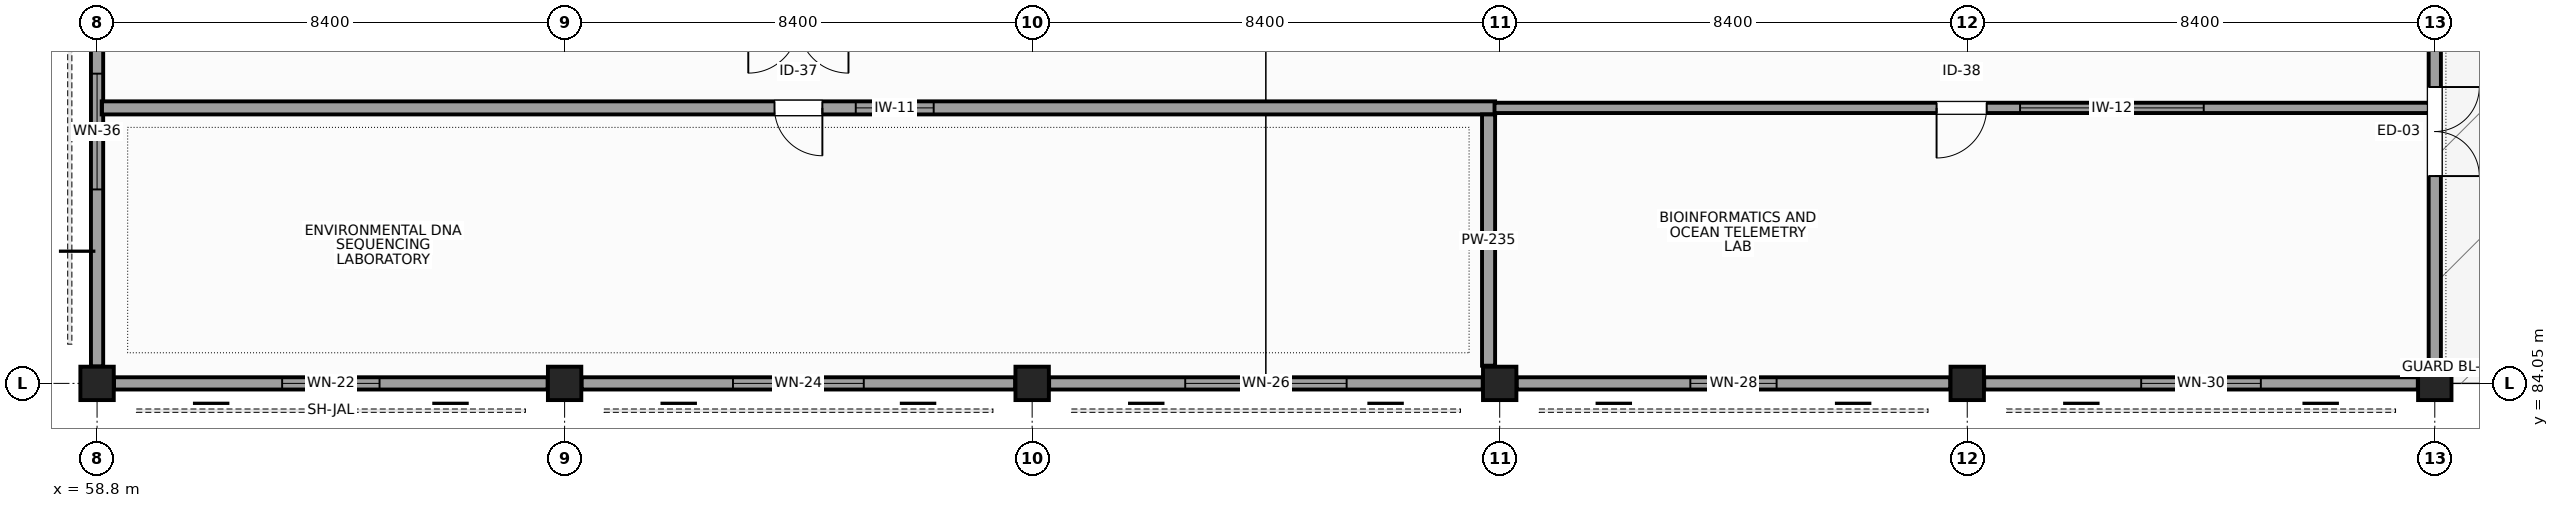
"""IFC4 building model, lengths in metres.
Left out: names, types, materials, properties, quantities, classifications, styles, units other than length and angle.
Written with IfcOpenShell. Run it as: python <this file> out.ifc"""

import sys

from ifc_helpers import new_model, si_unit, direction, frame, frame_2d, origin, origin_2d, place, context, subcontext, project, spatial, rectangle, extrude, element, fill, save


model = new_model("IFC4")
c1 = context("Model", 3, precision=1e-05, world=origin(), true_north=direction((0.0, 1.0)))
c2 = subcontext(c1, "Body", "Model", "MODEL_VIEW")
j1 = project(units=[si_unit("LENGTHUNIT", "METRE"), si_unit("PLANEANGLEUNIT", "RADIAN")], contexts=[c1])
p1 = place(None, origin())
s1 = spatial("IfcSite", under=j1, at=p1, CompositionType="ELEMENT")
p2 = place(p1, origin())
s2 = spatial("IfcBuilding", under=s1, at=p2, CompositionType="ELEMENT")
p3 = place(p2, frame((0.0, 0.0, 20.1)))
s3 = spatial("IfcBuildingStorey", under=s2, at=p3, CompositionType="ELEMENT", Elevation=20.1)
for number, where, z_axis, x_axis in (
    (1, (58.8, 84.05, 0.0), (0.0, 0.0, 1.0), (1.0, 0.0, 0.0)),
    (2, (67.2, 84.05, 0.0), (0.0, 0.0, 1.0), (1.0, 0.0, 0.0)),
    (3, (75.6, 84.05, 0.0), (0.0, 0.0, 1.0), (1.0, 0.0, 0.0)),
    (4, (84.0, 84.05, 0.0), (0.0, 0.0, 1.0), (1.0, 0.0, 0.0)),
    (5, (92.4, 84.05, 0.0), (0.0, 0.0, 1.0), (1.0, 0.0, 0.0)),
    (6, (100.8, 84.05, 0.0), (0.0, 0.0, 1.0), (1.0, 0.0, 0.0)),
):
    element("IfcColumn", number, at=place(p3, frame(where, z_axis=z_axis, x_axis=x_axis)), inside=s3, PredefinedType="COLUMN", context=c2, shape_type="SweptSolid", body=[
        extrude(rectangle(XDim=0.6, YDim=0.6, at=origin_2d()), origin(), (0.0, 0.0, 1.0), 4.5),
    ])
p4 = place(p3, frame((59.105, 84.05, 0.0), z_axis=(0.0, 0.0, 1.0), x_axis=(1.0, 0.0, 0.0)))
e7 = element("IfcWall", 7, at=p4, inside=s3, PredefinedType="STANDARD", context=c2, shape_type="SweptSolid", body=[
    extrude(rectangle(XDim=7.79, YDim=0.22, at=frame_2d((3.895, 0.0))), origin(), (0.0, 0.0, 1.0), 3.631),
])
p5 = place(p4, frame((3.02, 0.0, 0.95)))
e8 = element("IfcOpeningElement", 8, at=p5, cuts=e7, PredefinedType="OPENING", context=c2, shape_type="SweptSolid", body=[
    extrude(rectangle(XDim=1.75, YDim=1.95, at=frame_2d((0.875, 0.975))), frame((0.0, 0.12, 0.0), z_axis=(0.0, -1.0, 0.0), x_axis=(1.0, 0.0, 0.0)), (0.0, 0.0, 1.0), 0.24),
])
p6 = place(p3, frame((67.505, 84.05, 0.0), z_axis=(0.0, 0.0, 1.0), x_axis=(1.0, 0.0, 0.0)))
e9 = element("IfcWall", 9, at=p6, inside=s3, PredefinedType="STANDARD", context=c2, shape_type="SweptSolid", body=[
    extrude(rectangle(XDim=7.79, YDim=0.22, at=frame_2d((3.895, 0.0))), origin(), (0.0, 0.0, 1.0), 3.631),
])
p7 = place(p6, frame((2.72, 0.0, 0.95)))
e10 = element("IfcOpeningElement", 10, at=p7, cuts=e9, PredefinedType="OPENING", context=c2, shape_type="SweptSolid", body=[
    extrude(rectangle(XDim=2.35, YDim=1.7, at=frame_2d((1.175, 0.85))), frame((0.0, 0.12, 0.0), z_axis=(0.0, -1.0, 0.0), x_axis=(1.0, 0.0, 0.0)), (0.0, 0.0, 1.0), 0.24),
])
p8 = place(p3, frame((75.905, 84.05, 0.0), z_axis=(0.0, 0.0, 1.0), x_axis=(1.0, 0.0, 0.0)))
e11 = element("IfcWall", 11, at=p8, inside=s3, PredefinedType="STANDARD", context=c2, shape_type="SweptSolid", body=[
    extrude(rectangle(XDim=7.79, YDim=0.22, at=frame_2d((3.895, 0.0))), origin(), (0.0, 0.0, 1.0), 3.631),
])
p9 = place(p8, frame((2.445, 0.0, 0.95)))
e12 = element("IfcOpeningElement", 12, at=p9, cuts=e11, PredefinedType="OPENING", context=c2, shape_type="SweptSolid", body=[
    extrude(rectangle(XDim=2.9, YDim=1.9, at=frame_2d((1.45, 0.95))), frame((0.0, 0.12, 0.0), z_axis=(0.0, -1.0, 0.0), x_axis=(1.0, 0.0, 0.0)), (0.0, 0.0, 1.0), 0.24),
])
p10 = place(p3, frame((84.305, 84.05, 0.0), z_axis=(0.0, 0.0, 1.0), x_axis=(1.0, 0.0, 0.0)))
e13 = element("IfcWall", 13, at=p10, inside=s3, PredefinedType="STANDARD", context=c2, shape_type="SweptSolid", body=[
    extrude(rectangle(XDim=7.79, YDim=0.22, at=frame_2d((3.895, 0.0))), origin(), (0.0, 0.0, 1.0), 3.631),
])
p11 = place(p10, frame((3.12, 0.0, 0.95)))
e14 = element("IfcOpeningElement", 14, at=p11, cuts=e13, PredefinedType="OPENING", context=c2, shape_type="SweptSolid", body=[
    extrude(rectangle(XDim=1.55, YDim=1.7, at=frame_2d((0.775, 0.85))), frame((0.0, 0.12, 0.0), z_axis=(0.0, -1.0, 0.0), x_axis=(1.0, 0.0, 0.0)), (0.0, 0.0, 1.0), 0.24),
])
p12 = place(p3, frame((92.705, 84.05, 0.0), z_axis=(0.0, 0.0, 1.0), x_axis=(1.0, 0.0, 0.0)))
e15 = element("IfcWall", 15, at=p12, inside=s3, PredefinedType="STANDARD", context=c2, shape_type="SweptSolid", body=[
    extrude(rectangle(XDim=7.79, YDim=0.22, at=frame_2d((3.895, 0.0))), origin(), (0.0, 0.0, 1.0), 3.631),
])
p13 = place(p12, frame((2.82, 0.0, 0.95)))
e16 = element("IfcOpeningElement", 16, at=p13, cuts=e15, PredefinedType="OPENING", context=c2, shape_type="SweptSolid", body=[
    extrude(rectangle(XDim=2.15, YDim=2.3, at=frame_2d((1.075, 1.15))), frame((0.0, 0.12, 0.0), z_axis=(0.0, -1.0, 0.0), x_axis=(1.0, 0.0, 0.0)), (0.0, 0.0, 1.0), 0.24),
])
p14 = place(p3, frame((100.8, 84.355, 0.0), z_axis=(0.0, 0.0, 1.0), x_axis=(0.0, 1.0, 0.0)))
e17 = element("IfcWall", 17, at=p14, inside=s3, PredefinedType="STANDARD", context=c2, shape_type="SweptSolid", body=[
    extrude(rectangle(XDim=8.44, YDim=0.22, at=frame_2d((4.22, 0.0))), origin(), (0.0, 0.0, 1.0), 3.631),
])
p15 = place(p14, frame((3.42, 0.0, 0.0)))
e18 = element("IfcOpeningElement", 18, at=p15, cuts=e17, PredefinedType="OPENING", context=c2, shape_type="SweptSolid", body=[
    extrude(rectangle(XDim=1.6, YDim=2.25, at=frame_2d((0.8, 1.125))), frame((0.0, 0.12, 0.0), z_axis=(0.0, -1.0, 0.0), x_axis=(1.0, 0.0, 0.0)), (0.0, 0.0, 1.0), 0.24),
])
p16 = place(p3, frame((58.8, 92.795, 0.0), z_axis=(0.0, 0.0, 1.0), x_axis=(0.0, -1.0, 0.0)))
e19 = element("IfcWall", 19, at=p16, inside=s3, PredefinedType="STANDARD", context=c2, shape_type="SweptSolid", body=[
    extrude(rectangle(XDim=8.44, YDim=0.22, at=frame_2d((4.22, 0.0))), origin(), (0.0, 0.0, 1.0), 3.631),
])
p17 = place(p16, frame((3.18, 0.0, 0.95)))
e20 = element("IfcOpeningElement", 20, at=p17, cuts=e19, PredefinedType="OPENING", context=c2, shape_type="SweptSolid", body=[
    extrude(rectangle(XDim=2.08, YDim=2.28, at=frame_2d((1.04, 1.14))), frame((0.0, 0.12, 0.0), z_axis=(0.0, -1.0, 0.0), x_axis=(1.0, 0.0, 0.0)), (0.0, 0.0, 1.0), 0.24),
])
p18 = place(p3, frame((58.883, 89.0, 0.0), z_axis=(0.0, 0.0, 1.0), x_axis=(1.0, 0.0, 0.0)))
e21 = element("IfcWall", 21, at=p18, inside=s3, PredefinedType="PARTITIONING", context=c2, shape_type="SweptSolid", body=[
    extrude(rectangle(XDim=25.035, YDim=0.235, at=frame_2d((12.518, 0.0))), origin(), (0.0, 0.0, 1.0), 3.631),
])
p19 = place(p18, frame((12.088, 0.0, 0.0)))
e22 = element("IfcOpeningElement", 22, at=p19, cuts=e21, PredefinedType="OPENING", context=c2, shape_type="SweptSolid", body=[
    extrude(rectangle(XDim=0.86, YDim=2.1, at=frame_2d((0.43, 1.05))), frame((0.0, 0.127, 0.0), z_axis=(0.0, -1.0, 0.0), x_axis=(1.0, 0.0, 0.0)), (0.0, 0.0, 1.0), 0.255),
])
p20 = place(p18, frame((13.548, 0.0, 1.05)))
e23 = element("IfcOpeningElement", 23, at=p20, cuts=e21, PredefinedType="OPENING", context=c2, shape_type="SweptSolid", body=[
    extrude(rectangle(XDim=1.4, YDim=1.1, at=frame_2d((0.7, 0.55))), frame((0.0, 0.127, 0.0), z_axis=(0.0, -1.0, 0.0), x_axis=(1.0, 0.0, 0.0)), (0.0, 0.0, 1.0), 0.255),
])
p21 = place(p3, frame((83.8, 84.368, 0.0), z_axis=(0.0, 0.0, 1.0), x_axis=(0.0, 1.0, 0.0)))
e24 = element("IfcWall", 24, at=p21, inside=s3, PredefinedType="PARTITIONING", context=c2, shape_type="SweptSolid", body=[
    extrude(rectangle(XDim=4.514, YDim=0.235, at=frame_2d((2.257, 0.0))), origin(), (0.0, 0.0, 1.0), 3.631),
])
p22 = place(p3, frame((83.907, 89.0, 0.0), z_axis=(0.0, 0.0, 1.0), x_axis=(1.0, 0.0, 0.0)))
e25 = element("IfcWall", 25, at=p22, inside=s3, PredefinedType="PARTITIONING", context=c2, shape_type="SweptSolid", body=[
    extrude(rectangle(XDim=16.785, YDim=0.185, at=frame_2d((8.393, 0.0))), origin(), (0.0, 0.0, 1.0), 3.631),
])
p23 = place(p22, frame((7.942, 0.0, 0.0)))
e26 = element("IfcOpeningElement", 26, at=p23, cuts=e25, PredefinedType="OPENING", context=c2, shape_type="SweptSolid", body=[
    extrude(rectangle(XDim=0.9, YDim=2.16, at=frame_2d((0.45, 1.08))), frame((0.0, 0.103, 0.0), z_axis=(0.0, -1.0, 0.0), x_axis=(1.0, 0.0, 0.0)), (0.0, 0.0, 1.0), 0.205),
])
p24 = place(p22, frame((9.442, 0.0, 1.05)))
e27 = element("IfcOpeningElement", 27, at=p24, cuts=e25, PredefinedType="OPENING", context=c2, shape_type="SweptSolid", body=[
    extrude(rectangle(XDim=3.3, YDim=1.35, at=frame_2d((1.65, 0.675))), frame((0.0, 0.103, 0.0), z_axis=(0.0, -1.0, 0.0), x_axis=(1.0, 0.0, 0.0)), (0.0, 0.0, 1.0), 0.205),
])
p25 = place(p5, origin())
e28 = element("IfcWindow", 28, at=p25, inside=s3, PartitioningType="SINGLE_PANEL", PredefinedType="WINDOW", context=c2, shape_type="SweptSolid", body=[
    extrude(rectangle(XDim=1.75, YDim=1.95, at=frame_2d((0.875, 0.975))), frame((0.0, 0.03, 0.0), z_axis=(0.0, -1.0, 0.0), x_axis=(1.0, 0.0, 0.0)), (0.0, 0.0, 1.0), 0.06),
])
fill(e8, e28)
p26 = place(p7, origin())
e29 = element("IfcWindow", 29, at=p26, inside=s3, PartitioningType="SINGLE_PANEL", PredefinedType="WINDOW", context=c2, shape_type="SweptSolid", body=[
    extrude(rectangle(XDim=2.35, YDim=1.7, at=frame_2d((1.175, 0.85))), frame((0.0, 0.03, 0.0), z_axis=(0.0, -1.0, 0.0), x_axis=(1.0, 0.0, 0.0)), (0.0, 0.0, 1.0), 0.06),
])
fill(e10, e29)
p27 = place(p9, origin())
e30 = element("IfcWindow", 30, at=p27, inside=s3, PartitioningType="SINGLE_PANEL", PredefinedType="WINDOW", context=c2, shape_type="SweptSolid", body=[
    extrude(rectangle(XDim=2.9, YDim=1.9, at=frame_2d((1.45, 0.95))), frame((0.0, 0.03, 0.0), z_axis=(0.0, -1.0, 0.0), x_axis=(1.0, 0.0, 0.0)), (0.0, 0.0, 1.0), 0.06),
])
fill(e12, e30)
p28 = place(p11, origin())
e31 = element("IfcWindow", 31, at=p28, inside=s3, PartitioningType="SINGLE_PANEL", PredefinedType="WINDOW", context=c2, shape_type="SweptSolid", body=[
    extrude(rectangle(XDim=1.55, YDim=1.7, at=frame_2d((0.775, 0.85))), frame((0.0, 0.03, 0.0), z_axis=(0.0, -1.0, 0.0), x_axis=(1.0, 0.0, 0.0)), (0.0, 0.0, 1.0), 0.06),
])
fill(e14, e31)
p29 = place(p13, origin())
e32 = element("IfcWindow", 32, at=p29, inside=s3, PartitioningType="SINGLE_PANEL", PredefinedType="WINDOW", context=c2, shape_type="SweptSolid", body=[
    extrude(rectangle(XDim=2.15, YDim=2.3, at=frame_2d((1.075, 1.15))), frame((0.0, 0.03, 0.0), z_axis=(0.0, -1.0, 0.0), x_axis=(1.0, 0.0, 0.0)), (0.0, 0.0, 1.0), 0.06),
])
fill(e16, e32)
p30 = place(p15, frame((1.6, 0.0, 0.0), z_axis=(0.0, 0.0, 1.0), x_axis=(-1.0, 0.0, 0.0)))
e33 = element("IfcDoor", 33, at=p30, inside=s3, OperationType="DOUBLE_DOOR_SINGLE_SWING", PredefinedType="DOOR", context=c2, shape_type="SweptSolid", body=[
    extrude(rectangle(XDim=1.6, YDim=2.25, at=frame_2d((0.8, 1.125))), frame((0.0, 0.025, 0.0), z_axis=(0.0, -1.0, 0.0), x_axis=(1.0, 0.0, 0.0)), (0.0, 0.0, 1.0), 0.05),
])
fill(e18, e33)
p31 = place(p17, origin())
e34 = element("IfcWindow", 34, at=p31, inside=s3, PartitioningType="SINGLE_PANEL", PredefinedType="WINDOW", context=c2, shape_type="SweptSolid", body=[
    extrude(rectangle(XDim=2.08, YDim=2.28, at=frame_2d((1.04, 1.14))), frame((0.0, 0.03, 0.0), z_axis=(0.0, -1.0, 0.0), x_axis=(1.0, 0.0, 0.0)), (0.0, 0.0, 1.0), 0.06),
])
fill(e20, e34)
p32 = place(p19, frame((0.86, 0.0, 0.0), z_axis=(0.0, 0.0, 1.0), x_axis=(-1.0, 0.0, 0.0)))
e35 = element("IfcDoor", 35, at=p32, inside=s3, OperationType="SINGLE_SWING_LEFT", PredefinedType="DOOR", context=c2, shape_type="SweptSolid", body=[
    extrude(rectangle(XDim=0.86, YDim=2.1, at=frame_2d((0.43, 1.05))), frame((0.0, 0.025, 0.0), z_axis=(0.0, -1.0, 0.0), x_axis=(1.0, 0.0, 0.0)), (0.0, 0.0, 1.0), 0.05),
])
fill(e22, e35)
p33 = place(p20, origin())
e36 = element("IfcWindow", 36, at=p33, inside=s3, PartitioningType="SINGLE_PANEL", PredefinedType="WINDOW", context=c2, shape_type="SweptSolid", body=[
    extrude(rectangle(XDim=1.4, YDim=1.1, at=frame_2d((0.7, 0.55))), frame((0.0, 0.03, 0.0), z_axis=(0.0, -1.0, 0.0), x_axis=(1.0, 0.0, 0.0)), (0.0, 0.0, 1.0), 0.06),
])
fill(e23, e36)
p34 = place(p23, frame((0.9, 0.0, 0.0), z_axis=(0.0, 0.0, 1.0), x_axis=(-1.0, 0.0, 0.0)))
e37 = element("IfcDoor", 37, at=p34, inside=s3, OperationType="SINGLE_SWING_RIGHT", PredefinedType="DOOR", context=c2, shape_type="SweptSolid", body=[
    extrude(rectangle(XDim=0.9, YDim=2.16, at=frame_2d((0.45, 1.08))), frame((0.0, 0.025, 0.0), z_axis=(0.0, -1.0, 0.0), x_axis=(1.0, 0.0, 0.0)), (0.0, 0.0, 1.0), 0.05),
])
fill(e26, e37)
p35 = place(p24, origin())
e38 = element("IfcWindow", 38, at=p35, inside=s3, PartitioningType="SINGLE_PANEL", PredefinedType="WINDOW", context=c2, shape_type="SweptSolid", body=[
    extrude(rectangle(XDim=3.3, YDim=1.35, at=frame_2d((1.65, 0.675))), frame((0.0, 0.03, 0.0), z_axis=(0.0, -1.0, 0.0), x_axis=(1.0, 0.0, 0.0)), (0.0, 0.0, 1.0), 0.06),
])
fill(e27, e38)
save(model, sys.argv[1])
